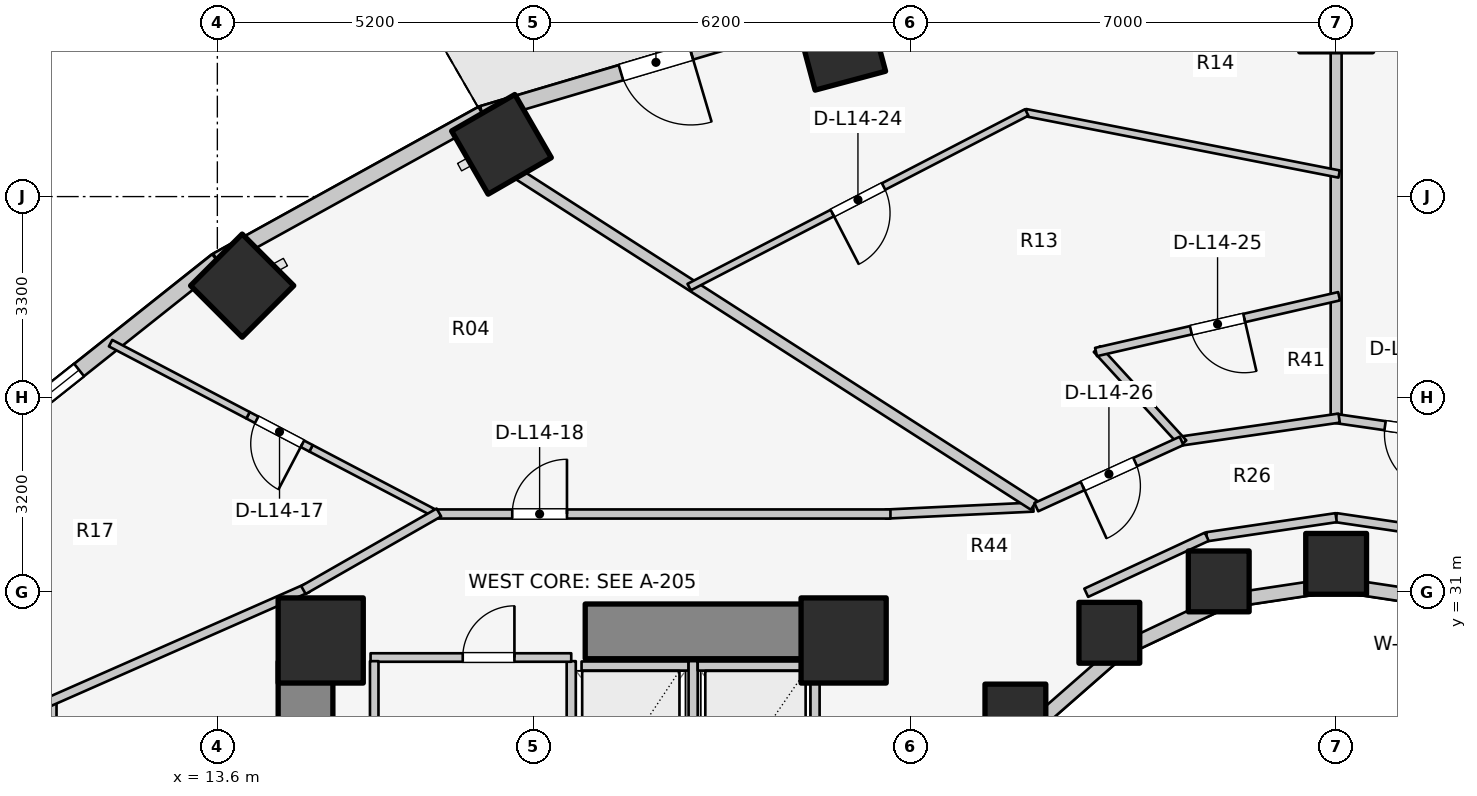
"""IFC4 building model, lengths in metres.
Left out: names, types, materials, properties, quantities, classifications, styles, units other than length and angle.
Written with IfcOpenShell. Run it as: python <this file> out.ifc"""

import sys

from ifc_helpers import new_model, si_unit, direction, frame, frame_2d, origin, origin_2d, place, context, subcontext, project, spatial, rectangle, extrude, element, fill, save


model = new_model("IFC4")
c1 = context("Model", 3, precision=1e-05, world=origin(), true_north=direction((0.0, 1.0)))
c2 = subcontext(c1, "Body", "Model", "MODEL_VIEW")
j1 = project(units=[si_unit("LENGTHUNIT", "METRE"), si_unit("PLANEANGLEUNIT", "RADIAN")], contexts=[c1])
p1 = place(None, origin())
s1 = spatial("IfcSite", under=j1, at=p1, CompositionType="ELEMENT")
p2 = place(p1, origin())
s2 = spatial("IfcBuilding", under=s1, at=p2, CompositionType="ELEMENT")
p3 = place(p2, frame((0.0, 0.0, 49.3)))
s3 = spatial("IfcBuildingStorey", under=s2, at=p3, CompositionType="ELEMENT", Elevation=49.3)
p4 = place(p3, frame((15.05, 17.05, 0.0), z_axis=(0.0, 0.0, 1.0), x_axis=(0.0, 1.0, 0.0)))
e1 = element("IfcWall", 1, at=p4, inside=s3, PredefinedType="SHEAR", context=c2, shape_type="SweptSolid", body=[
    extrude(rectangle(XDim=12.8, YDim=0.9, at=frame_2d((6.4, 0.0))), origin(), (0.0, 0.0, 1.0), 3.1),
])
p5 = place(p3, frame((19.65, 30.35, 0.0), z_axis=(0.0, 0.0, 1.0), x_axis=(1.0, 0.0, 0.0)))
e2 = element("IfcWall", 2, at=p5, inside=s3, PredefinedType="SHEAR", context=c2, shape_type="SweptSolid", body=[
    extrude(rectangle(XDim=4.5, YDim=0.9, at=frame_2d((2.25, 0.0))), origin(), (0.0, 0.0, 1.0), 3.1),
])
for number, where, z_axis, x_axis in (
    (3, (23.9, 30.2, 0.0), (0.0, 0.0, 1.0), (1.0, 0.0, 0.0)),
    (4, (15.3, 30.2, 0.0), (0.0, 0.0, 1.0), (1.0, 0.0, 0.0)),
):
    element("IfcColumn", number, at=place(p3, frame(where, z_axis=z_axis, x_axis=x_axis)), inside=s3, PredefinedType="COLUMN", context=c2, shape_type="SweptSolid", body=[
        extrude(rectangle(XDim=1.4, YDim=1.4, at=origin_2d()), origin(), (0.0, 0.0, 1.0), 3.1),
    ])
for number, where, z_axis, x_axis in (
    (5, (32.0, 31.46, 0.0), (0.0, 0.0, 1.0), (1.0, 0.0, 0.0)),
    (6, (30.069, 31.172, 0.0), (0.0, 0.0, 1.0), (1.0, 0.0, 0.0)),
):
    element("IfcColumn", number, at=place(p3, frame(where, z_axis=z_axis, x_axis=x_axis)), inside=s3, PredefinedType="COLUMN", context=c2, shape_type="SweptSolid", body=[
        extrude(rectangle(XDim=1.0, YDim=1.0, at=origin_2d()), origin(), (0.0, 0.0, 1.0), 3.1),
    ])
p6 = place(p3, frame((23.855, 39.986, 0.0), z_axis=(0.0, 0.0, 1.0), x_axis=(-0.258819045103, 0.965925826289, 0.0)))
e7 = element("IfcColumn", 7, at=p6, inside=s3, PredefinedType="COLUMN", context=c2, shape_type="SweptSolid", body=[
    extrude(rectangle(XDim=1.2, YDim=1.2, at=origin_2d()), origin(), (0.0, 0.0, 1.0), 3.1),
])
p7 = place(p3, frame((28.27, 30.327, 0.0), z_axis=(0.0, 0.0, 1.0), x_axis=(1.0, 0.0, 0.0)))
e8 = element("IfcColumn", 8, at=p7, inside=s3, PredefinedType="COLUMN", context=c2, shape_type="SweptSolid", body=[
    extrude(rectangle(XDim=1.0, YDim=1.0, at=origin_2d()), origin(), (0.0, 0.0, 1.0), 3.1),
])
p8 = place(p3, frame((18.273, 38.359, 0.0), z_axis=(0.0, 0.0, 1.0), x_axis=(-0.5, 0.866025403784, 0.0)))
e9 = element("IfcColumn", 9, at=p8, inside=s3, PredefinedType="COLUMN", context=c2, shape_type="SweptSolid", body=[
    extrude(rectangle(XDim=1.2, YDim=1.2, at=origin_2d()), origin(), (0.0, 0.0, 1.0), 3.1),
])
p9 = place(p3, frame((26.725, 28.982, 0.0), z_axis=(0.0, 0.0, 1.0), x_axis=(1.0, 0.0, 0.0)))
e10 = element("IfcColumn", 10, at=p9, inside=s3, PredefinedType="COLUMN", context=c2, shape_type="SweptSolid", body=[
    extrude(rectangle(XDim=1.0, YDim=1.0, at=origin_2d()), origin(), (0.0, 0.0, 1.0), 3.1),
])
p10 = place(p3, frame((14.008, 36.035, 0.0), z_axis=(0.0, 0.0, 1.0), x_axis=(-0.707106781187, 0.707106781187, 0.0)))
e11 = element("IfcColumn", 11, at=p10, inside=s3, PredefinedType="COLUMN", context=c2, shape_type="SweptSolid", body=[
    extrude(rectangle(XDim=1.2, YDim=1.2, at=origin_2d()), origin(), (0.0, 0.0, 1.0), 3.1),
])
for number, where, z_axis, x_axis in (
    (12, (33.843, 30.843, 0.0), (0.0, 0.0, 1.0), (-0.989, 0.149, 0.0)),
    (13, (32.0, 31.12, 0.0), (0.0, 0.0, 1.0), (-0.989, -0.149, 0.0)),
):
    element("IfcWall", number, at=place(p3, frame(where, z_axis=z_axis, x_axis=x_axis)), inside=s3, PredefinedType="STANDARD", context=c2, shape_type="SweptSolid", body=[
        extrude(rectangle(XDim=1.864, YDim=0.23, at=frame_2d((0.932, 0.0))), origin(), (0.0, 0.0, 1.0), 2.16),
    ])
p11 = place(p3, frame((30.157, 30.843, 0.0), z_axis=(0.0, 0.0, 1.0), x_axis=(-0.904179699603, -0.427152280606, 0.0)))
e14 = element("IfcWall", 14, at=p11, inside=s3, PredefinedType="STANDARD", context=c2, shape_type="SweptSolid", body=[
    extrude(rectangle(XDim=1.899, YDim=0.23, at=frame_2d((0.95, 0.0))), origin(), (0.0, 0.0, 1.0), 2.16),
])
p12 = place(p3, frame((28.44, 30.032, 0.0), z_axis=(0.0, 0.0, 1.0), x_axis=(-0.752576694707, -0.658504607869, 0.0)))
e15 = element("IfcWall", 15, at=p12, inside=s3, PredefinedType="STANDARD", context=c2, shape_type="SweptSolid", body=[
    extrude(rectangle(XDim=1.959, YDim=0.23, at=frame_2d((0.98, 0.0))), origin(), (0.0, 0.0, 1.0), 2.16),
])
p13 = place(p3, frame((23.668, 40.553, 0.0), z_axis=(0.0, 0.0, 1.0), x_axis=(-0.958843593522, -0.283934786811, 0.0)))
e16 = element("IfcWall", 16, at=p13, inside=s3, PredefinedType="STANDARD", context=c2, shape_type="SweptSolid", body=[
    extrude(rectangle(XDim=5.955, YDim=0.26, at=frame_2d((2.978, 0.0))), origin(), (0.0, 0.0, 1.0), 2.88),
])
p14 = place(p13, frame((2.378, 0.0, 0.0)))
e17 = element("IfcOpeningElement", 17, at=p14, cuts=e16, PredefinedType="OPENING", context=c2, shape_type="SweptSolid", body=[
    extrude(rectangle(XDim=1.2, YDim=2.2, at=frame_2d((0.6, 1.1))), frame((0.0, 0.14, 0.0), z_axis=(0.0, -1.0, 0.0), x_axis=(1.0, 0.0, 0.0)), (0.0, 0.0, 1.0), 0.28),
])
p15 = place(p3, frame((17.958, 38.862, 0.0), z_axis=(0.0, 0.0, 1.0), x_axis=(-0.875137303239, -0.483874674352, 0.0)))
e18 = element("IfcWall", 18, at=p15, inside=s3, PredefinedType="STANDARD", context=c2, shape_type="SweptSolid", body=[
    extrude(rectangle(XDim=4.985, YDim=0.26, at=frame_2d((2.493, 0.0))), origin(), (0.0, 0.0, 1.0), 2.85),
])
p16 = place(p3, frame((13.595, 36.45, 0.0), z_axis=(0.0, 0.0, 1.0), x_axis=(-0.783123133379, -0.621866672179, 0.0)))
e19 = element("IfcWall", 19, at=p16, inside=s3, PredefinedType="STANDARD", context=c2, shape_type="SweptSolid", body=[
    extrude(rectangle(XDim=4.839, YDim=0.26, at=frame_2d((2.419, 0.0))), origin(), (0.0, 0.0, 1.0), 2.85),
])
p17 = place(p16, frame((2.898, 0.0, 0.75)))
e20 = element("IfcOpeningElement", 20, at=p17, cuts=e19, PredefinedType="OPENING", context=c2, shape_type="SweptSolid", body=[
    extrude(rectangle(XDim=1.2, YDim=1.5, at=frame_2d((0.6, 0.75))), frame((0.0, 0.14, 0.0), z_axis=(0.0, -1.0, 0.0), x_axis=(1.0, 0.0, 0.0)), (0.0, 0.0, 1.0), 0.28),
])
p18 = place(p3, frame((19.59, 29.78, 0.0), z_axis=(0.0, 0.0, 1.0), x_axis=(1.0, 0.0, 0.0)))
e21 = element("IfcWall", 21, at=p18, inside=s3, PredefinedType="SOLIDWALL", context=c2, shape_type="SweptSolid", body=[
    extrude(rectangle(XDim=1.76, YDim=0.15, at=frame_2d((0.88, 0.0))), origin(), (0.0, 0.0, 1.0), 2.855),
])
for number, where, z_axis, x_axis in (
    (22, (19.42, 27.14, 0.0), (0.0, 0.0, 1.0), (0.0, 1.0, 0.0)),
    (23, (21.425, 27.14, 0.0), (0.0, 0.0, 1.0), (0.0, 1.0, 0.0)),
):
    element("IfcWall", number, at=place(p3, frame(where, z_axis=z_axis, x_axis=x_axis)), inside=s3, PredefinedType="SOLIDWALL", context=c2, shape_type="SweptSolid", body=[
        extrude(rectangle(XDim=2.72, YDim=0.15, at=frame_2d((1.36, 0.0))), origin(), (0.0, 0.0, 1.0), 2.855),
    ])
p19 = place(p3, frame((21.5, 29.78, 0.0), z_axis=(0.0, 0.0, 1.0), x_axis=(1.0, 0.0, 0.0)))
e24 = element("IfcWall", 24, at=p19, inside=s3, PredefinedType="SOLIDWALL", context=c2, shape_type="SweptSolid", body=[
    extrude(rectangle(XDim=1.76, YDim=0.15, at=frame_2d((0.88, 0.0))), origin(), (0.0, 0.0, 1.0), 2.855),
])
p20 = place(p3, frame((23.43, 27.14, 0.0), z_axis=(0.0, 0.0, 1.0), x_axis=(0.0, 1.0, 0.0)))
e25 = element("IfcWall", 25, at=p20, inside=s3, PredefinedType="SOLIDWALL", context=c2, shape_type="SweptSolid", body=[
    extrude(rectangle(XDim=2.72, YDim=0.15, at=frame_2d((1.36, 0.0))), origin(), (0.0, 0.0, 1.0), 2.855),
])
p21 = place(p3, frame((16.12, 29.92, 0.0), z_axis=(0.0, 0.0, 1.0), x_axis=(1.0, 0.0, 0.0)))
e26 = element("IfcWall", 26, at=p21, inside=s3, PredefinedType="PLUMBINGWALL", context=c2, shape_type="SweptSolid", body=[
    extrude(rectangle(XDim=3.3, YDim=0.14, at=frame_2d((1.65, 0.0))), origin(), (0.0, 0.0, 1.0), 2.855),
])
p22 = place(p21, frame((1.516, 0.0, 0.0)))
e27 = element("IfcOpeningElement", 27, at=p22, cuts=e26, PredefinedType="OPENING", context=c2, shape_type="SweptSolid", body=[
    extrude(rectangle(XDim=0.85, YDim=2.05, at=frame_2d((0.425, 1.025))), frame((0.0, 0.08, 0.0), z_axis=(0.0, -1.0, 0.0), x_axis=(1.0, 0.0, 0.0)), (0.0, 0.0, 1.0), 0.16),
])
p23 = place(p3, frame((16.18, 25.98, 0.0), z_axis=(0.0, 0.0, 1.0), x_axis=(0.0, 1.0, 0.0)))
e28 = element("IfcWall", 28, at=p23, inside=s3, PredefinedType="PLUMBINGWALL", context=c2, shape_type="SweptSolid", body=[
    extrude(rectangle(XDim=3.88, YDim=0.14, at=frame_2d((1.94, 0.0))), origin(), (0.0, 0.0, 1.0), 2.855),
])
for number, where, z_axis, x_axis in (
    (29, (34.127, 31.906, 0.0), (0.0, 0.0, 1.0), (-0.989, 0.146, 0.0)),
    (30, (32.0, 32.22, 0.0), (0.0, 0.0, 1.0), (-0.989, -0.146, 0.0)),
):
    element("IfcWall", number, at=place(p3, frame(where, z_axis=z_axis, x_axis=x_axis)), inside=s3, PredefinedType="PARTITIONING", context=c2, shape_type="SweptSolid", body=[
        extrude(rectangle(XDim=2.151, YDim=0.15, at=frame_2d((1.075, 0.0))), origin(), (0.0, 0.0, 1.0), 2.237),
    ])
p24 = place(p3, frame((29.873, 31.906, 0.0), z_axis=(0.0, 0.0, 1.0), x_axis=(-0.906943449489, -0.421252393975, 0.0)))
e31 = element("IfcWall", 31, at=p24, inside=s3, PredefinedType="PARTITIONING", context=c2, shape_type="SweptSolid", body=[
    extrude(rectangle(XDim=2.186, YDim=0.15, at=frame_2d((1.093, 0.0))), origin(), (0.0, 0.0, 1.0), 2.237),
])
p25 = place(p3, frame((10.88, 16.748, 0.0), z_axis=(0.0, 0.0, 1.0), x_axis=(0.0, 1.0, 0.0)))
e32 = element("IfcWall", 32, at=p25, inside=s3, PredefinedType="PARTITIONING", context=c2, shape_type="SweptSolid", body=[
    extrude(rectangle(XDim=12.503, YDim=0.15, at=frame_2d((6.252, 0.0))), origin(), (0.0, 0.0, 1.0), 2.12),
])
p26 = place(p3, frame((7.014, 29.212, 0.0), z_axis=(0.0, 0.0, 1.0), x_axis=(1.0, 0.0, 0.0)))
e33 = element("IfcWall", 33, at=p26, inside=s3, PredefinedType="PARTITIONING", context=c2, shape_type="SweptSolid", body=[
    extrude(rectangle(XDim=3.866, YDim=0.15, at=frame_2d((1.933, 0.0))), origin(), (0.0, 0.0, 1.0), 2.855),
])
p27 = place(p3, frame((10.844, 29.196, 0.0), z_axis=(0.0, 0.0, 1.0), x_axis=(0.91502756289, 0.403391322604, 0.0)))
e34 = element("IfcWall", 34, at=p27, inside=s3, PredefinedType="PARTITIONING", context=c2, shape_type="SweptSolid", body=[
    extrude(rectangle(XDim=4.637, YDim=0.15, at=frame_2d((2.319, 0.0))), origin(), (0.0, 0.0, 1.0), 2.069),
])
p28 = place(p3, frame((17.244, 32.257, 0.0), z_axis=(0.0, 0.0, 1.0), x_axis=(-0.885586030676, 0.464475383924, 0.0)))
e35 = element("IfcWall", 35, at=p28, inside=s3, PredefinedType="MOVABLE", context=c2, shape_type="SweptSolid", body=[
    extrude(rectangle(XDim=2.376, YDim=0.12, at=frame_2d((1.188, 0.0))), origin(), (0.0, 0.0, 1.0), 2.855),
])
p29 = place(p3, frame((15.14, 33.36, 0.0), z_axis=(0.0, 0.0, 1.0), x_axis=(-0.885447282698, 0.464739829972, 0.0)))
e36 = element("IfcWall", 36, at=p29, inside=s3, PredefinedType="MOVABLE", context=c2, shape_type="SweptSolid", body=[
    extrude(rectangle(XDim=1.17, YDim=0.12, at=frame_2d((0.585, 0.0))), origin(), (0.0, 0.0, 1.0), 2.11),
])
p30 = place(p29, frame((0.16, 0.0, 0.0)))
e37 = element("IfcOpeningElement", 37, at=p30, cuts=e36, PredefinedType="OPENING", context=c2, shape_type="SweptSolid", body=[
    extrude(rectangle(XDim=0.85, YDim=2.05, at=frame_2d((0.425, 1.025))), frame((0.0, 0.07, 0.0), z_axis=(0.0, -1.0, 0.0), x_axis=(1.0, 0.0, 0.0)), (0.0, 0.0, 1.0), 0.14),
])
p31 = place(p3, frame((14.104, 33.904, 0.0), z_axis=(0.0, 0.0, 1.0), x_axis=(-0.885573027611, 0.464500175208, 0.0)))
e38 = element("IfcWall", 38, at=p31, inside=s3, PredefinedType="MOVABLE", context=c2, shape_type="SweptSolid", body=[
    extrude(rectangle(XDim=2.552, YDim=0.12, at=frame_2d((1.276, 0.0))), origin(), (0.0, 0.0, 1.0), 2.855),
])
p32 = place(p3, frame((27.02, 32.394, 0.0), z_axis=(0.0, 0.0, 1.0), x_axis=(-0.998877427952, -0.047369651964, 0.0)))
e39 = element("IfcWall", 39, at=p32, inside=s3, PredefinedType="PARTITIONING", context=c2, shape_type="SweptSolid", body=[
    extrude(rectangle(XDim=2.433, YDim=0.15, at=frame_2d((1.216, 0.0))), origin(), (0.0, 0.0, 1.0), 2.237),
])
p33 = place(p3, frame((17.15, 32.28, 0.0), z_axis=(0.0, 0.0, 1.0), x_axis=(1.0, 0.0, 0.0)))
e40 = element("IfcWall", 40, at=p33, inside=s3, PredefinedType="PARTITIONING", context=c2, shape_type="SweptSolid", body=[
    extrude(rectangle(XDim=7.52, YDim=0.15, at=frame_2d((3.76, 0.0))), origin(), (0.0, 0.0, 1.0), 2.237),
])
p34 = place(p33, frame((1.3, 0.0, 0.0)))
e41 = element("IfcOpeningElement", 41, at=p34, cuts=e40, PredefinedType="OPENING", context=c2, shape_type="SweptSolid", body=[
    extrude(rectangle(XDim=0.9, YDim=2.1, at=frame_2d((0.45, 1.05))), frame((0.0, 0.085, 0.0), z_axis=(0.0, -1.0, 0.0), x_axis=(1.0, 0.0, 0.0)), (0.0, 0.0, 1.0), 0.17),
])
p35 = place(p3, frame((17.243, 32.305, 0.0), z_axis=(0.0, 0.0, 1.0), x_axis=(-0.867991349648, -0.496579315857, 0.0)))
e42 = element("IfcWall", 42, at=p35, inside=s3, PredefinedType="PARTITIONING", context=c2, shape_type="SweptSolid", body=[
    extrude(rectangle(XDim=2.567, YDim=0.15, at=frame_2d((1.283, 0.0))), origin(), (0.0, 0.0, 1.0), 2.069),
])
p36 = place(p3, frame((32.0, 33.905, 0.0), z_axis=(0.0, 0.0, 1.0), x_axis=(0.0, 1.0, 0.0)))
e43 = element("IfcWall", 43, at=p36, inside=s3, PredefinedType="PARTITIONING", context=c2, shape_type="SweptSolid", body=[
    extrude(rectangle(XDim=5.995, YDim=0.18, at=frame_2d((2.998, 0.0))), origin(), (0.0, 0.0, 1.0), 2.237),
])
p37 = place(p3, frame((27.029, 32.426, 0.0), z_axis=(0.0, 0.0, 1.0), x_axis=(-0.841689919529, 0.5399611832, 0.0)))
e44 = element("IfcWall", 44, at=p37, inside=s3, PredefinedType="PARTITIONING", context=c2, shape_type="SweptSolid", body=[
    extrude(rectangle(XDim=10.058, YDim=0.18, at=frame_2d((5.029, 0.0))), origin(), (0.0, 0.0, 1.0), 2.237),
])
p38 = place(p3, frame((34.556, 33.478, 0.0), z_axis=(0.0, 0.0, 1.0), x_axis=(-0.989637894688, 0.143585644814, 0.0)))
e45 = element("IfcWall", 45, at=p38, inside=s3, PredefinedType="PARTITIONING", context=c2, shape_type="SweptSolid", body=[
    extrude(rectangle(XDim=2.59, YDim=0.15, at=frame_2d((1.295, 0.0))), origin(), (0.0, 0.0, 1.0), 2.237),
])
p39 = place(p38, frame((0.82, 0.0, 0.0)))
e46 = element("IfcOpeningElement", 46, at=p39, cuts=e45, PredefinedType="OPENING", context=c2, shape_type="SweptSolid", body=[
    extrude(rectangle(XDim=0.95, YDim=2.1, at=frame_2d((0.475, 1.05))), frame((0.0, 0.085, 0.0), z_axis=(0.0, -1.0, 0.0), x_axis=(1.0, 0.0, 0.0)), (0.0, 0.0, 1.0), 0.17),
])
p40 = place(p3, frame((32.049, 37.871, 0.0), z_axis=(0.0, 0.0, 1.0), x_axis=(-0.981343325718, 0.192263561471, 0.0)))
e47 = element("IfcWall", 47, at=p40, inside=s3, PredefinedType="MOVABLE", context=c2, shape_type="SweptSolid", body=[
    extrude(rectangle(XDim=5.255, YDim=0.12, at=frame_2d((2.627, 0.0))), origin(), (0.0, 0.0, 1.0), 2.237),
])
p41 = place(p3, frame((26.911, 38.884, 0.0), z_axis=(0.0, 0.0, 1.0), x_axis=(-0.88815498257, -0.459544042433, 0.0)))
e48 = element("IfcWall", 48, at=p41, inside=s3, PredefinedType="MOVABLE", context=c2, shape_type="SweptSolid", body=[
    extrude(rectangle(XDim=6.251, YDim=0.12, at=frame_2d((3.125, 0.0))), origin(), (0.0, 0.0, 1.0), 2.237),
])
p42 = place(p41, frame((2.65, 0.0, 0.0)))
e49 = element("IfcOpeningElement", 49, at=p42, cuts=e48, PredefinedType="OPENING", context=c2, shape_type="SweptSolid", body=[
    extrude(rectangle(XDim=0.95, YDim=2.1, at=frame_2d((0.475, 1.05))), frame((0.0, 0.07, 0.0), z_axis=(0.0, -1.0, 0.0), x_axis=(1.0, 0.0, 0.0)), (0.0, 0.0, 1.0), 0.14),
])
p43 = place(p3, frame((32.05, 33.857, 0.0), z_axis=(0.0, 0.0, 1.0), x_axis=(-0.989649898776, -0.143502884474, 0.0)))
e50 = element("IfcWall", 50, at=p43, inside=s3, PredefinedType="PARTITIONING", context=c2, shape_type="SweptSolid", body=[
    extrude(rectangle(XDim=2.676, YDim=0.15, at=frame_2d((1.338, 0.0))), origin(), (0.0, 0.0, 1.0), 2.237),
])
p44 = place(p3, frame((29.484, 33.443, 0.0), z_axis=(0.0, 0.0, 1.0), x_axis=(-0.675445566455, 0.737409849918, 0.0)))
e51 = element("IfcWall", 51, at=p44, inside=s3, PredefinedType="PLUMBINGWALL", context=c2, shape_type="SweptSolid", body=[
    extrude(rectangle(XDim=2.1, YDim=0.14, at=frame_2d((1.05, 0.0))), origin(), (0.0, 0.0, 1.0), 2.855),
])
p45 = place(p3, frame((32.049, 35.861, 0.0), z_axis=(0.0, 0.0, 1.0), x_axis=(-0.974672340529, -0.223637717318, 0.0)))
e52 = element("IfcWall", 52, at=p45, inside=s3, PredefinedType="PLUMBINGWALL", context=c2, shape_type="SweptSolid", body=[
    extrude(rectangle(XDim=4.101, YDim=0.14, at=frame_2d((2.051, 0.0))), origin(), (0.0, 0.0, 1.0), 2.237),
])
p46 = place(p45, frame((1.601, 0.0, 0.0)))
e53 = element("IfcOpeningElement", 53, at=p46, cuts=e52, PredefinedType="OPENING", context=c2, shape_type="SweptSolid", body=[
    extrude(rectangle(XDim=0.9, YDim=2.1, at=frame_2d((0.45, 1.05))), frame((0.0, 0.08, 0.0), z_axis=(0.0, -1.0, 0.0), x_axis=(1.0, 0.0, 0.0)), (0.0, 0.0, 1.0), 0.16),
])
p47 = place(p3, frame((29.457, 33.482, 0.0), z_axis=(0.0, 0.0, 1.0), x_axis=(-0.909747571199, -0.415161843982, 0.0)))
e54 = element("IfcWall", 54, at=p47, inside=s3, PredefinedType="PARTITIONING", context=c2, shape_type="SweptSolid", body=[
    extrude(rectangle(XDim=2.625, YDim=0.15, at=frame_2d((1.312, 0.0))), origin(), (0.0, 0.0, 1.0), 2.237),
])
p48 = place(p47, frame((0.838, 0.0, 0.0)))
e55 = element("IfcOpeningElement", 55, at=p48, cuts=e54, PredefinedType="OPENING", context=c2, shape_type="SweptSolid", body=[
    extrude(rectangle(XDim=0.95, YDim=2.1, at=frame_2d((0.475, 1.05))), frame((0.0, 0.085, 0.0), z_axis=(0.0, -1.0, 0.0), x_axis=(1.0, 0.0, 0.0)), (0.0, 0.0, 1.0), 0.17),
])
p49 = place(p14, origin())
e56 = element("IfcDoor", 56, at=p49, inside=s3, OperationType="SINGLE_SWING_LEFT", PredefinedType="DOOR", context=c2, shape_type="SweptSolid", body=[
    extrude(rectangle(XDim=1.2, YDim=2.2, at=frame_2d((0.6, 1.1))), frame((0.0, 0.025, 0.0), z_axis=(0.0, -1.0, 0.0), x_axis=(1.0, 0.0, 0.0)), (0.0, 0.0, 1.0), 0.05),
])
fill(e17, e56)
p50 = place(p17, origin())
e57 = element("IfcWindow", 57, at=p50, inside=s3, PartitioningType="SINGLE_PANEL", PredefinedType="WINDOW", context=c2, shape_type="SweptSolid", body=[
    extrude(rectangle(XDim=1.2, YDim=1.5, at=frame_2d((0.6, 0.75))), frame((0.0, 0.03, 0.0), z_axis=(0.0, -1.0, 0.0), x_axis=(1.0, 0.0, 0.0)), (0.0, 0.0, 1.0), 0.06),
])
fill(e20, e57)
p51 = place(p22, origin())
e58 = element("IfcDoor", 58, at=p51, inside=s3, OperationType="SINGLE_SWING_RIGHT", PredefinedType="DOOR", context=c2, shape_type="SweptSolid", body=[
    extrude(rectangle(XDim=0.85, YDim=2.05, at=frame_2d((0.425, 1.025))), frame((0.0, 0.025, 0.0), z_axis=(0.0, -1.0, 0.0), x_axis=(1.0, 0.0, 0.0)), (0.0, 0.0, 1.0), 0.05),
])
fill(e27, e58)
p52 = place(p30, origin())
e59 = element("IfcDoor", 59, at=p52, inside=s3, OperationType="SINGLE_SWING_LEFT", PredefinedType="DOOR", context=c2, shape_type="SweptSolid", body=[
    extrude(rectangle(XDim=0.85, YDim=2.05, at=frame_2d((0.425, 1.025))), frame((0.0, 0.025, 0.0), z_axis=(0.0, -1.0, 0.0), x_axis=(1.0, 0.0, 0.0)), (0.0, 0.0, 1.0), 0.05),
])
fill(e37, e59)
p53 = place(p34, origin())
e60 = element("IfcDoor", 60, at=p53, inside=s3, OperationType="SINGLE_SWING_RIGHT", PredefinedType="DOOR", context=c2, shape_type="SweptSolid", body=[
    extrude(rectangle(XDim=0.9, YDim=2.1, at=frame_2d((0.45, 1.05))), frame((0.0, 0.025, 0.0), z_axis=(0.0, -1.0, 0.0), x_axis=(1.0, 0.0, 0.0)), (0.0, 0.0, 1.0), 0.05),
])
fill(e41, e60)
p54 = place(p39, origin())
e61 = element("IfcDoor", 61, at=p54, inside=s3, OperationType="SINGLE_SWING_LEFT", PredefinedType="DOOR", context=c2, shape_type="SweptSolid", body=[
    extrude(rectangle(XDim=0.95, YDim=2.1, at=frame_2d((0.475, 1.05))), frame((0.0, 0.025, 0.0), z_axis=(0.0, -1.0, 0.0), x_axis=(1.0, 0.0, 0.0)), (0.0, 0.0, 1.0), 0.05),
])
fill(e46, e61)
p55 = place(p42, origin())
e62 = element("IfcDoor", 62, at=p55, inside=s3, OperationType="SINGLE_SWING_RIGHT", PredefinedType="DOOR", context=c2, shape_type="SweptSolid", body=[
    extrude(rectangle(XDim=0.95, YDim=2.1, at=frame_2d((0.475, 1.05))), frame((0.0, 0.025, 0.0), z_axis=(0.0, -1.0, 0.0), x_axis=(1.0, 0.0, 0.0)), (0.0, 0.0, 1.0), 0.05),
])
fill(e49, e62)
p56 = place(p46, origin())
e63 = element("IfcDoor", 63, at=p56, inside=s3, OperationType="SINGLE_SWING_LEFT", PredefinedType="DOOR", context=c2, shape_type="SweptSolid", body=[
    extrude(rectangle(XDim=0.9, YDim=2.1, at=frame_2d((0.45, 1.05))), frame((0.0, 0.025, 0.0), z_axis=(0.0, -1.0, 0.0), x_axis=(1.0, 0.0, 0.0)), (0.0, 0.0, 1.0), 0.05),
])
fill(e53, e63)
p57 = place(p48, origin())
e64 = element("IfcDoor", 64, at=p57, inside=s3, OperationType="SINGLE_SWING_RIGHT", PredefinedType="DOOR", context=c2, shape_type="SweptSolid", body=[
    extrude(rectangle(XDim=0.95, YDim=2.1, at=frame_2d((0.475, 1.05))), frame((0.0, 0.025, 0.0), z_axis=(0.0, -1.0, 0.0), x_axis=(1.0, 0.0, 0.0)), (0.0, 0.0, 1.0), 0.05),
])
fill(e55, e64)
save(model, sys.argv[1])
